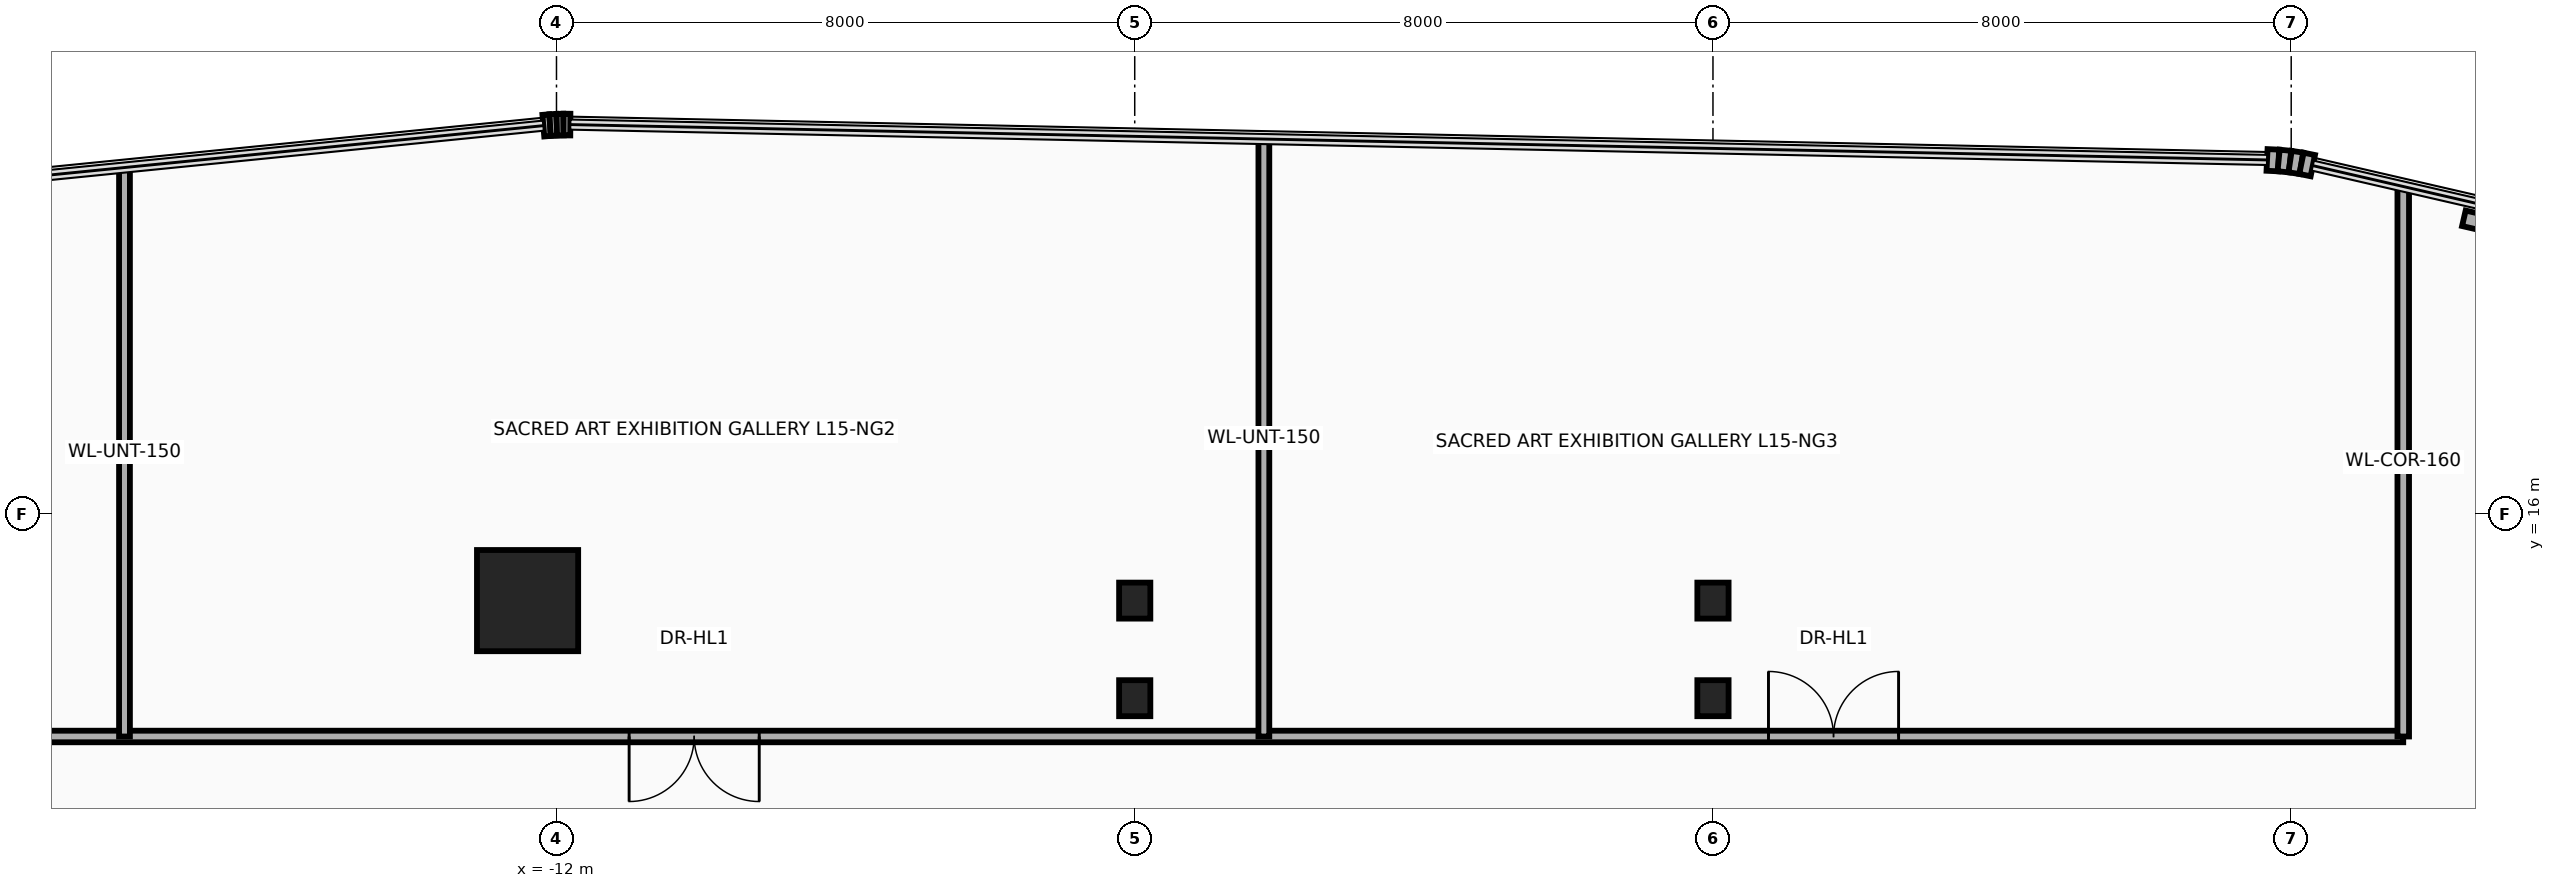
"""IFC4 building model, lengths in metres.
Left out: names, types, materials, properties, quantities, classifications, styles, units other than length and angle.
Written with IfcOpenShell. Run it as: python <this file> out.ifc"""

import sys

from ifc_helpers import new_model, si_unit, direction, frame, frame_2d, origin, origin_2d, place, context, subcontext, project, spatial, rectangle, i_section, extrude, source, transform, mapped, element, fill, save


model = new_model("IFC4")
c1 = context("Model", 3, precision=1e-05, world=origin(), true_north=direction((0.0, 1.0)))
c2 = subcontext(c1, "Body", "Model", "MODEL_VIEW")
j1 = project(units=[si_unit("LENGTHUNIT", "METRE"), si_unit("PLANEANGLEUNIT", "RADIAN")], contexts=[c1])
p1 = place(None, origin())
s1 = spatial("IfcSite", under=j1, at=p1, CompositionType="ELEMENT")
p2 = place(p1, origin())
s2 = spatial("IfcBuilding", under=s1, at=p2, CompositionType="ELEMENT")
p3 = place(p2, frame((0.0, 0.0, 63.0)))
s3 = spatial("IfcBuildingStorey", under=s2, at=p3, CompositionType="ELEMENT", Elevation=63.0)
m1 = source(origin(), c2, "Body", "SweptSolid", [
    extrude(rectangle(XDim=1.4, YDim=1.4, at=origin_2d()), origin(), (0.0, 0.0, 1.0), 3.7),
])
p4 = place(p3, frame((-12.4, 14.8, 0.0), z_axis=(0.0, 0.0, 1.0), x_axis=(1.0, 0.0, 0.0)))
e1 = element("IfcColumn", 1, at=p4, inside=s3, PredefinedType="COLUMN", context=c2, shape_type="MappedRepresentation", body=[
    mapped(m1, transform((0.0, 0.0, 0.0), x_axis=(1.0, 0.0, 0.0), y_axis=(0.0, 1.0, 0.0), z_axis=(0.0, 0.0, 1.0), scale=1.0)),
])
m2 = source(origin(), c2, "Body", "SweptSolid", [
    extrude(i_section(OverallWidth=0.432, OverallDepth=0.498, WebThickness=0.056, FlangeThickness=0.089, at=origin_2d()), origin(), (0.0, 0.0, 1.0), 3.7),
])
for number, where, z_axis, x_axis in (
    (2, (-4.0, 13.45, 0.0), (0.0, 0.0, 1.0), (1.0, 0.0, 0.0)),
    (3, (-4.0, 14.8, 0.0), (0.0, 0.0, 1.0), (1.0, 0.0, 0.0)),
    (4, (4.0, 13.45, 0.0), (0.0, 0.0, 1.0), (1.0, 0.0, 0.0)),
    (5, (4.0, 14.8, 0.0), (0.0, 0.0, 1.0), (1.0, 0.0, 0.0)),
):
    element("IfcColumn", number, at=place(p3, frame(where, z_axis=z_axis, x_axis=x_axis)), inside=s3, PredefinedType="COLUMN", context=c2, shape_type="MappedRepresentation", body=[
        mapped(m2, transform((0.0, 0.0, 0.0), x_axis=(1.0, 0.0, 0.0), y_axis=(0.0, 1.0, 0.0), z_axis=(0.0, 0.0, 1.0), scale=1.0)),
    ])
p5 = place(p3, frame((-12.182, 21.371, 0.0), z_axis=(0.0, 0.0, 1.0), x_axis=(0.996527790842, 0.08326080759, 0.0)))
e6 = element("IfcWall", 6, at=p5, inside=s3, PredefinedType="SOLIDWALL", context=c2, shape_type="SweptSolid", body=[
    extrude(rectangle(XDim=0.094, YDim=0.3, at=frame_2d((0.047, 0.0))), origin(), (0.0, 0.0, 1.0), 3.46),
])
p6 = place(p3, frame((-12.088, 21.379, 0.0), z_axis=(0.0, 0.0, 1.0), x_axis=(0.998476480444, 0.055178963393, 0.0)))
e7 = element("IfcWall", 7, at=p6, inside=s3, PredefinedType="SOLIDWALL", context=c2, shape_type="SweptSolid", body=[
    extrude(rectangle(XDim=0.093, YDim=0.3, at=frame_2d((0.046, 0.0))), origin(), (0.0, 0.0, 1.0), 3.46),
])
p7 = place(p3, frame((-11.996, 21.384, 0.0), z_axis=(0.0, 0.0, 1.0), x_axis=(0.999722573757, 0.023553673204, 0.0)))
e8 = element("IfcWall", 8, at=p7, inside=s3, PredefinedType="SOLIDWALL", context=c2, shape_type="SweptSolid", body=[
    extrude(rectangle(XDim=0.093, YDim=0.3, at=frame_2d((0.047, 0.0))), origin(), (0.0, 0.0, 1.0), 3.46),
])
p8 = place(p3, frame((-11.902, 21.386, 0.0), z_axis=(0.0, 0.0, 1.0), x_axis=(0.999986507273, -0.005194735103, 0.0)))
e9 = element("IfcWall", 9, at=p8, inside=s3, PredefinedType="SOLIDWALL", context=c2, shape_type="SweptSolid", body=[
    extrude(rectangle(XDim=0.094, YDim=0.3, at=frame_2d((0.047, 0.0))), origin(), (0.0, 0.0, 1.0), 3.46),
])
p9 = place(p3, frame((11.666, 20.897, 0.0), z_axis=(0.0, 0.0, 1.0), x_axis=(0.998885297239, -0.047203421059, 0.0)))
e10 = element("IfcWall", 10, at=p9, inside=s3, PredefinedType="SOLIDWALL", context=c2, shape_type="SweptSolid", body=[
    extrude(rectangle(XDim=0.16, YDim=0.3, at=frame_2d((0.08, 0.0))), origin(), (0.0, 0.0, 1.0), 3.46),
])
p10 = place(p3, frame((11.826, 20.889, 0.0), z_axis=(0.0, 0.0, 1.0), x_axis=(0.995172891136, -0.098137234257, 0.0)))
e11 = element("IfcWall", 11, at=p10, inside=s3, PredefinedType="SOLIDWALL", context=c2, shape_type="SweptSolid", body=[
    extrude(rectangle(XDim=0.159, YDim=0.3, at=frame_2d((0.08, 0.0))), origin(), (0.0, 0.0, 1.0), 3.46),
])
p11 = place(p3, frame((11.984, 20.874, 0.0), z_axis=(0.0, 0.0, 1.0), x_axis=(0.988846069207, -0.148941100486, 0.0)))
e12 = element("IfcWall", 12, at=p11, inside=s3, PredefinedType="SOLIDWALL", context=c2, shape_type="SweptSolid", body=[
    extrude(rectangle(XDim=0.159, YDim=0.3, at=frame_2d((0.08, 0.0))), origin(), (0.0, 0.0, 1.0), 3.46),
])
p12 = place(p3, frame((12.142, 20.85, 0.0), z_axis=(0.0, 0.0, 1.0), x_axis=(0.979991950448, -0.19903712482, 0.0)))
e13 = element("IfcWall", 13, at=p12, inside=s3, PredefinedType="SOLIDWALL", context=c2, shape_type="SweptSolid", body=[
    extrude(rectangle(XDim=0.161, YDim=0.3, at=frame_2d((0.08, 0.0))), origin(), (0.0, 0.0, 1.0), 3.46),
])
p13 = place(p3, frame((14.389, 20.09, 0.0), z_axis=(0.0, 0.0, 1.0), x_axis=(0.974400545997, -0.224818984875, 0.0)))
e14 = element("IfcWall", 14, at=p13, inside=s3, PredefinedType="SOLIDWALL", context=c2, shape_type="SweptSolid", body=[
    extrude(rectangle(XDim=2.2, YDim=0.22, at=frame_2d((1.1, 0.0))), origin(), (0.0, 0.0, 1.0), 3.46),
])
p14 = place(p13, frame((0.65, 0.0, 0.95)))
e15 = element("IfcOpeningElement", 15, at=p14, cuts=e14, PredefinedType="OPENING", context=c2, shape_type="SweptSolid", body=[
    extrude(rectangle(XDim=0.9, YDim=1.3, at=frame_2d((0.45, 0.65))), frame((0.0, 0.125, 0.0), z_axis=(0.0, -1.0, 0.0), x_axis=(1.0, 0.0, 0.0)), (0.0, 0.0, 1.0), 0.25),
])
p15 = place(p3, frame((-31.89, 12.92, 0.0), z_axis=(0.0, 0.0, 1.0), x_axis=(1.0, 0.0, 0.0)))
e16 = element("IfcWall", 16, at=p15, inside=s3, PredefinedType="PARTITIONING", context=c2, shape_type="SweptSolid", body=[
    extrude(rectangle(XDim=45.44, YDim=0.16, at=frame_2d((22.72, 0.0))), origin(), (0.0, 0.0, 1.0), 2.583),
])
p16 = place(p15, frame((6.057, 0.0, 0.0)))
e17 = element("IfcOpeningElement", 17, at=p16, cuts=e16, PredefinedType="OPENING", context=c2, shape_type="SweptSolid", body=[
    extrude(rectangle(XDim=1.8, YDim=2.15, at=frame_2d((0.9, 1.075))), frame((0.0, 0.095, 0.0), z_axis=(0.0, -1.0, 0.0), x_axis=(1.0, 0.0, 0.0)), (0.0, 0.0, 1.0), 0.19),
])
p17 = place(p15, frame((20.895, 0.0, 0.0)))
e18 = element("IfcOpeningElement", 18, at=p17, cuts=e16, PredefinedType="OPENING", context=c2, shape_type="SweptSolid", body=[
    extrude(rectangle(XDim=1.8, YDim=2.15, at=frame_2d((0.9, 1.075))), frame((0.0, 0.095, 0.0), z_axis=(0.0, -1.0, 0.0), x_axis=(1.0, 0.0, 0.0)), (0.0, 0.0, 1.0), 0.19),
])
p18 = place(p15, frame((36.658, 0.0, 0.0)))
e19 = element("IfcOpeningElement", 19, at=p18, cuts=e16, PredefinedType="OPENING", context=c2, shape_type="SweptSolid", body=[
    extrude(rectangle(XDim=1.8, YDim=2.15, at=frame_2d((0.9, 1.075))), frame((0.0, 0.095, 0.0), z_axis=(0.0, -1.0, 0.0), x_axis=(1.0, 0.0, 0.0)), (0.0, 0.0, 1.0), 0.19),
])
p19 = place(p3, frame((13.55, 12.92, 0.0), z_axis=(0.0, 0.0, 1.0), x_axis=(0.0, 1.0, 0.0)))
e20 = element("IfcWall", 20, at=p19, inside=s3, PredefinedType="PARTITIONING", context=c2, shape_type="SweptSolid", body=[
    extrude(rectangle(XDim=7.609, YDim=0.16, at=frame_2d((3.805, 0.0))), origin(), (0.0, 0.0, 1.0), 2.583),
])
p20 = place(p3, frame((-17.977, 12.92, 0.0), z_axis=(0.0, 0.0, 1.0), x_axis=(0.0, 1.0, 0.0)))
e21 = element("IfcWall", 21, at=p20, inside=s3, PredefinedType="PARTITIONING", context=c2, shape_type="SweptSolid", body=[
    extrude(rectangle(XDim=7.872, YDim=0.15, at=frame_2d((3.936, 0.0))), origin(), (0.0, 0.0, 1.0), 2.583),
])
p21 = place(p3, frame((-2.213, 12.92, 0.0), z_axis=(0.0, 0.0, 1.0), x_axis=(0.0, 1.0, 0.0)))
e22 = element("IfcWall", 22, at=p21, inside=s3, PredefinedType="PARTITIONING", context=c2, shape_type="SweptSolid", body=[
    extrude(rectangle(XDim=8.266, YDim=0.15, at=frame_2d((4.133, 0.0))), origin(), (0.0, 0.0, 1.0), 2.583),
])
p22 = place(p17, frame((1.8, 0.0, 0.0), z_axis=(0.0, 0.0, 1.0), x_axis=(-1.0, 0.0, 0.0)))
e23 = element("IfcDoor", 23, at=p22, inside=s3, OperationType="DOUBLE_DOOR_SINGLE_SWING", PredefinedType="DOOR", context=c2, shape_type="SweptSolid", body=[
    extrude(rectangle(XDim=1.8, YDim=2.15, at=frame_2d((0.9, 1.075))), frame((0.0, 0.025, 0.0), z_axis=(0.0, -1.0, 0.0), x_axis=(1.0, 0.0, 0.0)), (0.0, 0.0, 1.0), 0.05),
])
fill(e18, e23)
p23 = place(p18, origin())
e24 = element("IfcDoor", 24, at=p23, inside=s3, OperationType="DOUBLE_DOOR_SINGLE_SWING", PredefinedType="DOOR", context=c2, shape_type="SweptSolid", body=[
    extrude(rectangle(XDim=1.8, YDim=2.15, at=frame_2d((0.9, 1.075))), frame((0.0, 0.025, 0.0), z_axis=(0.0, -1.0, 0.0), x_axis=(1.0, 0.0, 0.0)), (0.0, 0.0, 1.0), 0.05),
])
fill(e19, e24)
save(model, sys.argv[1])
